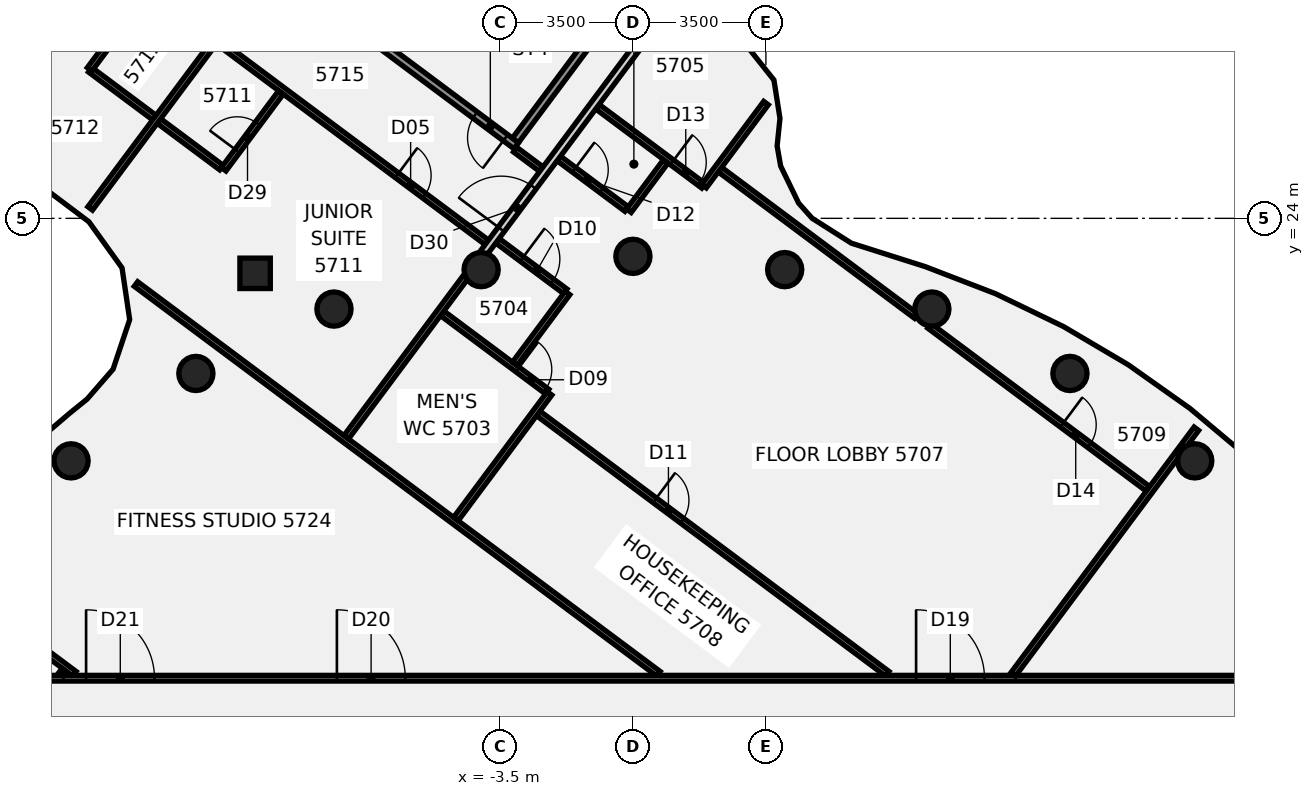
"""IFC4 building model, lengths in metres.
Left out: names, types, materials, properties, quantities, classifications, styles, units other than length and angle.
Written with IfcOpenShell. Run it as: python <this file> out.ifc"""

import sys

from ifc_helpers import new_model, si_unit, direction, frame, frame_2d, origin, origin_2d, place, context, subcontext, project, spatial, rectangle, circle, extrude, element, fill, save


model = new_model("IFC4")
c1 = context("Model", 3, precision=1e-05, world=origin(), true_north=direction((0.0, 1.0)))
c2 = subcontext(c1, "Body", "Model", "MODEL_VIEW")
j1 = project(units=[si_unit("LENGTHUNIT", "METRE"), si_unit("PLANEANGLEUNIT", "RADIAN")], contexts=[c1])
p1 = place(None, origin())
s1 = spatial("IfcSite", under=j1, at=p1, CompositionType="ELEMENT")
p2 = place(p1, origin())
s2 = spatial("IfcBuilding", under=s1, at=p2, CompositionType="ELEMENT")
p3 = place(p2, frame((0.0, 0.0, 227.1)))
s3 = spatial("IfcBuildingStorey", under=s2, at=p3, CompositionType="ELEMENT", Elevation=227.1)
for number, where, z_axis, x_axis in (
    (1, (14.784, 17.619, -0.14), (0.0, 0.0, 1.0), (1.0, 0.0, 0.0)),
    (2, (11.5, 19.919, -0.14), (0.0, 0.0, 1.0), (1.0, 0.0, 0.0)),
    (3, (7.866, 21.613, -0.14), (0.0, 0.0, 1.0), (1.0, 0.0, 0.0)),
    (4, (3.994, 22.651, -0.14), (0.0, 0.0, 1.0), (1.0, 0.0, 0.0)),
    (5, (0.0, 23.0, -0.14), (0.0, 0.0, 1.0), (1.0, 0.0, 0.0)),
    (6, (-3.994, 22.651, -0.14), (0.0, 0.0, 1.0), (1.0, 0.0, 0.0)),
    (7, (-7.866, 21.613, -0.14), (0.0, 0.0, 1.0), (1.0, 0.0, 0.0)),
    (8, (-11.5, 19.919, -0.14), (0.0, 0.0, 1.0), (1.0, 0.0, 0.0)),
    (9, (-14.784, 17.619, -0.14), (0.0, 0.0, 1.0), (1.0, 0.0, 0.0)),
):
    element("IfcColumn", number, at=place(p3, frame(where, z_axis=z_axis, x_axis=x_axis)), inside=s3, PredefinedType="COLUMN", context=c2, shape_type="SweptSolid", body=[
        extrude(circle(Radius=0.45, at=origin_2d()), origin(), (0.0, 0.0, 1.0), 3.6),
    ])
p4 = place(p3, frame((-9.942, 22.553, -0.139), z_axis=(-0.002304349187, -0.050289032263, 0.998732047753), x_axis=(0.597247430318, 0.800971813174, 0.041709249322)))
e10 = element("IfcColumn", 10, at=p4, inside=s3, PredefinedType="COLUMN", context=c2, shape_type="SweptSolid", body=[
    extrude(rectangle(XDim=0.8, YDim=0.8, at=origin_2d()), origin(), (0.0, 0.0, 1.0), 3.602),
])
p5 = place(p3, frame((-18.463, 14.827, 0.0), z_axis=(0.0, 0.0, 1.0), x_axis=(0.801555334436, -0.597920601617, 0.0)))
e11 = element("IfcWall", 11, at=p5, inside=s3, PredefinedType="PARTITIONING", context=c2, shape_type="SweptSolid", body=[
    extrude(rectangle(XDim=4.701, YDim=0.15, at=frame_2d((2.351, 0.0))), origin(), (0.0, 0.0, 1.0), 2.864),
])
p6 = place(p3, frame((-14.521, 31.333, 0.0), z_axis=(0.0, 0.0, 1.0), x_axis=(0.801510735955, -0.597980384418, 0.0)))
e12 = element("IfcWall", 12, at=p6, inside=s3, PredefinedType="PARTITIONING", context=c2, shape_type="SweptSolid", body=[
    extrude(rectangle(XDim=13.32, YDim=0.15, at=frame_2d((6.66, 0.0))), origin(), (0.0, 0.0, 1.0), 2.864),
])
p7 = place(p6, frame((10.37, 0.0, 0.0)))
e13 = element("IfcOpeningElement", 13, at=p7, cuts=e12, PredefinedType="OPENING", context=c2, shape_type="SweptSolid", body=[
    extrude(rectangle(XDim=0.9, YDim=2.1, at=frame_2d((0.45, 1.05))), frame((0.0, 0.085, 0.0), z_axis=(0.0, -1.0, 0.0), x_axis=(1.0, 0.0, 0.0)), (0.0, 0.0, 1.0), 0.17),
])
p8 = place(p6, frame((0.82, 0.0, 0.0)))
e14 = element("IfcOpeningElement", 14, at=p8, cuts=e12, PredefinedType="OPENING", context=c2, shape_type="SweptSolid", body=[
    extrude(rectangle(XDim=0.9, YDim=2.1, at=frame_2d((0.45, 1.05))), frame((0.0, 0.085, 0.0), z_axis=(0.0, -1.0, 0.0), x_axis=(1.0, 0.0, 0.0)), (0.0, 0.0, 1.0), 0.17),
])
p9 = place(p3, frame((-14.28, 27.909, 0.0), z_axis=(0.0, 0.0, 1.0), x_axis=(0.801738945952, -0.597674378356, 0.0)))
e15 = element("IfcWall", 15, at=p9, inside=s3, PredefinedType="PARTITIONING", context=c2, shape_type="SweptSolid", body=[
    extrude(rectangle(XDim=4.305, YDim=0.15, at=frame_2d((2.152, 0.0))), origin(), (0.0, 0.0, 1.0), 2.864),
])
p10 = place(p3, frame((-3.098, 25.807, 0.0), z_axis=(0.0, 0.0, 1.0), x_axis=(0.801599777433, -0.597861017979, 0.0)))
e16 = element("IfcWall", 16, at=p10, inside=s3, PredefinedType="PARTITIONING", context=c2, shape_type="SweptSolid", body=[
    extrude(rectangle(XDim=0.859, YDim=0.15, at=frame_2d((0.43, 0.0))), origin(), (0.0, 0.0, 1.0), 2.864),
])
p11 = place(p3, frame((-13.076, 22.271, 0.0), z_axis=(0.0, 0.0, 1.0), x_axis=(0.801609439626, -0.597848062891, 0.0)))
e17 = element("IfcWall", 17, at=p11, inside=s3, PredefinedType="PARTITIONING", context=c2, shape_type="SweptSolid", body=[
    extrude(rectangle(XDim=17.153, YDim=0.15, at=frame_2d((8.577, 0.0))), origin(), (0.0, 0.0, 1.0), 2.864),
])
p12 = place(p3, frame((-5.015, 21.498, 0.0), z_axis=(0.0, 0.0, 1.0), x_axis=(0.801666095662, -0.597772089568, 0.0)))
e18 = element("IfcWall", 18, at=p12, inside=s3, PredefinedType="PARTITIONING", context=c2, shape_type="SweptSolid", body=[
    extrude(rectangle(XDim=3.44, YDim=0.15, at=frame_2d((1.72, 0.0))), origin(), (0.0, 0.0, 1.0), 2.864),
])
p13 = place(p12, frame((2.47, 0.0, 0.0)))
e19 = element("IfcOpeningElement", 19, at=p13, cuts=e18, PredefinedType="OPENING", context=c2, shape_type="SweptSolid", body=[
    extrude(rectangle(XDim=0.9, YDim=2.1, at=frame_2d((0.45, 1.05))), frame((0.0, 0.085, 0.0), z_axis=(0.0, -1.0, 0.0), x_axis=(1.0, 0.0, 0.0)), (0.0, 0.0, 1.0), 0.17),
])
p14 = place(p3, frame((-3.564, 23.41, 0.0), z_axis=(0.0, 0.0, 1.0), x_axis=(0.801603412124, -0.59785614463, 0.0)))
e20 = element("IfcWall", 20, at=p14, inside=s3, PredefinedType="PARTITIONING", context=c2, shape_type="SweptSolid", body=[
    extrude(rectangle(XDim=2.225, YDim=0.15, at=frame_2d((1.113, 0.0))), origin(), (0.0, 0.0, 1.0), 2.864),
])
p15 = place(p14, frame((0.8, 0.0, 0.0)))
e21 = element("IfcOpeningElement", 21, at=p15, cuts=e20, PredefinedType="OPENING", context=c2, shape_type="SweptSolid", body=[
    extrude(rectangle(XDim=1.0, YDim=2.1, at=frame_2d((0.5, 1.05))), frame((0.0, 0.085, 0.0), z_axis=(0.0, -1.0, 0.0), x_axis=(1.0, 0.0, 0.0)), (0.0, 0.0, 1.0), 0.17),
])
p16 = place(p3, frame((-2.488, 18.865, 0.0), z_axis=(0.0, 0.0, 1.0), x_axis=(0.801633706651, -0.597815523686, 0.0)))
e22 = element("IfcWall", 22, at=p16, inside=s3, PredefinedType="PARTITIONING", context=c2, shape_type="SweptSolid", body=[
    extrude(rectangle(XDim=11.456, YDim=0.15, at=frame_2d((5.728, 0.0))), origin(), (0.0, 0.0, 1.0), 2.864),
])
p17 = place(p16, frame((3.82, 0.0, 0.0)))
e23 = element("IfcOpeningElement", 23, at=p17, cuts=e22, PredefinedType="OPENING", context=c2, shape_type="SweptSolid", body=[
    extrude(rectangle(XDim=0.9, YDim=2.1, at=frame_2d((0.45, 1.05))), frame((0.0, 0.085, 0.0), z_axis=(0.0, -1.0, 0.0), x_axis=(1.0, 0.0, 0.0)), (0.0, 0.0, 1.0), 0.17),
])
p18 = place(p3, frame((-1.95, 25.575, 0.0), z_axis=(0.0, 0.0, 1.0), x_axis=(0.801603412124, -0.59785614463, 0.0)))
e24 = element("IfcWall", 24, at=p18, inside=s3, PredefinedType="PARTITIONING", context=c2, shape_type="SweptSolid", body=[
    extrude(rectangle(XDim=2.225, YDim=0.15, at=frame_2d((1.113, 0.0))), origin(), (0.0, 0.0, 1.0), 2.864),
])
p19 = place(p18, frame((0.5, 0.0, 0.0)))
e25 = element("IfcOpeningElement", 25, at=p19, cuts=e24, PredefinedType="OPENING", context=c2, shape_type="SweptSolid", body=[
    extrude(rectangle(XDim=0.9, YDim=2.1, at=frame_2d((0.45, 1.05))), frame((0.0, 0.085, 0.0), z_axis=(0.0, -1.0, 0.0), x_axis=(1.0, 0.0, 0.0)), (0.0, 0.0, 1.0), 0.17),
])
p20 = place(p3, frame((-0.933, 26.937, 0.0), z_axis=(0.0, 0.0, 1.0), x_axis=(0.801462729776, -0.598044724732, 0.0)))
e26 = element("IfcWall", 26, at=p20, inside=s3, PredefinedType="PARTITIONING", context=c2, shape_type="SweptSolid", body=[
    extrude(rectangle(XDim=3.479, YDim=0.15, at=frame_2d((1.74, 0.0))), origin(), (0.0, 0.0, 1.0), 2.864),
])
p21 = place(p20, frame((2.449, 0.0, 0.0)))
e27 = element("IfcOpeningElement", 27, at=p21, cuts=e26, PredefinedType="OPENING", context=c2, shape_type="SweptSolid", body=[
    extrude(rectangle(XDim=0.9, YDim=2.1, at=frame_2d((0.45, 1.05))), frame((0.0, 0.085, 0.0), z_axis=(0.0, -1.0, 0.0), x_axis=(1.0, 0.0, 0.0)), (0.0, 0.0, 1.0), 0.17),
])
p22 = place(p3, frame((2.295, 25.278, 0.0), z_axis=(0.0, 0.0, 1.0), x_axis=(0.801612688657, -0.597843706486, 0.0)))
e28 = element("IfcWall", 28, at=p22, inside=s3, PredefinedType="PARTITIONING", context=c2, shape_type="SweptSolid", body=[
    extrude(rectangle(XDim=6.438, YDim=0.15, at=frame_2d((3.219, 0.0))), origin(), (0.0, 0.0, 1.0), 2.864),
])
p23 = place(p3, frame((7.804, 21.17, 0.0), z_axis=(0.0, 0.0, 1.0), x_axis=(0.801611703951, -0.597845026816, 0.0)))
e29 = element("IfcWall", 29, at=p23, inside=s3, PredefinedType="PARTITIONING", context=c2, shape_type="SweptSolid", body=[
    extrude(rectangle(XDim=7.167, YDim=0.15, at=frame_2d((3.583, 0.0))), origin(), (0.0, 0.0, 1.0), 2.864),
])
p24 = place(p23, frame((4.35, 0.0, 0.0)))
e30 = element("IfcOpeningElement", 30, at=p24, cuts=e29, PredefinedType="OPENING", context=c2, shape_type="SweptSolid", body=[
    extrude(rectangle(XDim=0.9, YDim=2.1, at=frame_2d((0.45, 1.05))), frame((0.0, 0.085, 0.0), z_axis=(0.0, -1.0, 0.0), x_axis=(1.0, 0.0, 0.0)), (0.0, 0.0, 1.0), 0.17),
])
p25 = place(p3, frame((-17.065, 11.9, 0.0), z_axis=(0.0, 0.0, 1.0), x_axis=(1.0, 0.0, 0.0)))
e31 = element("IfcWall", 31, at=p25, inside=s3, PredefinedType="PARTITIONING", context=c2, shape_type="SweptSolid", body=[
    extrude(rectangle(XDim=34.165, YDim=0.15, at=frame_2d((17.083, 0.0))), origin(), (0.0, 0.0, 1.0), 2.864),
])
p26 = place(p25, frame((24.517, 0.0, 0.0)))
e32 = element("IfcOpeningElement", 32, at=p26, cuts=e31, PredefinedType="OPENING", context=c2, shape_type="SweptSolid", body=[
    extrude(rectangle(XDim=1.8, YDim=2.1, at=frame_2d((0.9, 1.05))), frame((0.0, 0.085, 0.0), z_axis=(0.0, -1.0, 0.0), x_axis=(1.0, 0.0, 0.0)), (0.0, 0.0, 1.0), 0.17),
])
p27 = place(p25, frame((9.276, 0.0, 0.0)))
e33 = element("IfcOpeningElement", 33, at=p27, cuts=e31, PredefinedType="OPENING", context=c2, shape_type="SweptSolid", body=[
    extrude(rectangle(XDim=1.8, YDim=2.1, at=frame_2d((0.9, 1.05))), frame((0.0, 0.085, 0.0), z_axis=(0.0, -1.0, 0.0), x_axis=(1.0, 0.0, 0.0)), (0.0, 0.0, 1.0), 0.17),
])
p28 = place(p25, frame((2.676, 0.0, 0.0)))
e34 = element("IfcOpeningElement", 34, at=p28, cuts=e31, PredefinedType="OPENING", context=c2, shape_type="SweptSolid", body=[
    extrude(rectangle(XDim=1.8, YDim=2.1, at=frame_2d((0.9, 1.05))), frame((0.0, 0.085, 0.0), z_axis=(0.0, -1.0, 0.0), x_axis=(1.0, 0.0, 0.0)), (0.0, 0.0, 1.0), 0.17),
])
p29 = place(p3, frame((-15.047, 12.0, 0.0), z_axis=(0.0, 0.0, 1.0), x_axis=(0.598084412892, 0.801433113276, 0.0)))
e35 = element("IfcWall", 35, at=p29, inside=s3, PredefinedType="PARTITIONING", context=c2, shape_type="SweptSolid", body=[
    extrude(rectangle(XDim=0.143, YDim=0.15, at=frame_2d((0.071, 0.0))), origin(), (0.0, 0.0, 1.0), 2.864),
])
p30 = place(p3, frame((-17.877, 26.967, 0.0), z_axis=(0.0, 0.0, 1.0), x_axis=(0.597867717707, 0.801594780499, 0.0)))
e36 = element("IfcWall", 36, at=p30, inside=s3, PredefinedType="PARTITIONING", context=c2, shape_type="SweptSolid", body=[
    extrude(rectangle(XDim=13.405, YDim=0.15, at=frame_2d((6.703, 0.0))), origin(), (0.0, 0.0, 1.0), 2.864),
])
p31 = place(p30, frame((6.857, 0.0, 0.0)))
e37 = element("IfcOpeningElement", 37, at=p31, cuts=e36, PredefinedType="OPENING", context=c2, shape_type="SweptSolid", body=[
    extrude(rectangle(XDim=0.9, YDim=2.1, at=frame_2d((0.45, 1.05))), frame((0.0, 0.085, 0.0), z_axis=(0.0, -1.0, 0.0), x_axis=(1.0, 0.0, 0.0)), (0.0, 0.0, 1.0), 0.17),
])
p32 = place(p3, frame((-14.296, 27.921, 0.0), z_axis=(0.0, 0.0, 1.0), x_axis=(0.597548490033, 0.801832776867, 0.0)))
e38 = element("IfcWall", 38, at=p32, inside=s3, PredefinedType="PARTITIONING", context=c2, shape_type="SweptSolid", body=[
    extrude(rectangle(XDim=2.521, YDim=0.15, at=frame_2d((1.26, 0.0))), origin(), (0.0, 0.0, 1.0), 2.864),
])
p33 = place(p32, frame((0.6, 0.0, 0.0)))
e39 = element("IfcOpeningElement", 39, at=p33, cuts=e38, PredefinedType="OPENING", context=c2, shape_type="SweptSolid", body=[
    extrude(rectangle(XDim=0.9, YDim=2.1, at=frame_2d((0.45, 1.05))), frame((0.0, 0.085, 0.0), z_axis=(0.0, -1.0, 0.0), x_axis=(1.0, 0.0, 0.0)), (0.0, 0.0, 1.0), 0.17),
])
p34 = place(p3, frame((-14.281, 24.261, 0.0), z_axis=(0.0, 0.0, 1.0), x_axis=(0.59794643903, 0.801536060356, 0.0)))
e40 = element("IfcWall", 40, at=p34, inside=s3, PredefinedType="PARTITIONING", context=c2, shape_type="SweptSolid", body=[
    extrude(rectangle(XDim=5.446, YDim=0.15, at=frame_2d((2.723, 0.0))), origin(), (0.0, 0.0, 1.0), 2.864),
])
p35 = place(p3, frame((-10.769, 25.291, 0.0), z_axis=(0.0, 0.0, 1.0), x_axis=(0.597842875799, 0.801613308183, 0.0)))
e41 = element("IfcWall", 41, at=p35, inside=s3, PredefinedType="PARTITIONING", context=c2, shape_type="SweptSolid", body=[
    extrude(rectangle(XDim=2.52, YDim=0.15, at=frame_2d((1.26, 0.0))), origin(), (0.0, 0.0, 1.0), 2.864),
])
p36 = place(p35, frame((0.6, 0.0, 0.0)))
e42 = element("IfcOpeningElement", 42, at=p36, cuts=e41, PredefinedType="OPENING", context=c2, shape_type="SweptSolid", body=[
    extrude(rectangle(XDim=0.9, YDim=2.1, at=frame_2d((0.45, 1.05))), frame((0.0, 0.085, 0.0), z_axis=(0.0, -1.0, 0.0), x_axis=(1.0, 0.0, 0.0)), (0.0, 0.0, 1.0), 0.17),
])
p37 = place(p3, frame((-7.542, 18.243, 0.0), z_axis=(0.0, 0.0, 1.0), x_axis=(0.597845440825, 0.801611395182, 0.0)))
e43 = element("IfcWall", 43, at=p37, inside=s3, PredefinedType="PARTITIONING", context=c2, shape_type="SweptSolid", body=[
    extrude(rectangle(XDim=5.426, YDim=0.15, at=frame_2d((2.713, 0.0))), origin(), (0.0, 0.0, 1.0), 2.864),
])
p38 = place(p3, frame((-4.029, 22.954, 0.0), z_axis=(0.0, 0.0, 1.0), x_axis=(0.597834716072, 0.80161939364, 0.0)))
e44 = element("IfcWall", 44, at=p38, inside=s3, PredefinedType="PARTITIONING", context=c2, shape_type="SweptSolid", body=[
    extrude(rectangle(XDim=8.343, YDim=0.2, at=frame_2d((4.171, 0.0))), origin(), (0.0, 0.0, 1.0), 2.864),
])
p39 = place(p38, frame((0.944, 0.0, 0.0)))
e45 = element("IfcOpeningElement", 45, at=p39, cuts=e44, PredefinedType="OPENING", context=c2, shape_type="SweptSolid", body=[
    extrude(rectangle(XDim=1.4, YDim=2.1, at=frame_2d((0.7, 1.05))), frame((0.0, 0.11, 0.0), z_axis=(0.0, -1.0, 0.0), x_axis=(1.0, 0.0, 0.0)), (0.0, 0.0, 1.0), 0.22),
])
p40 = place(p3, frame((-4.656, 16.091, 0.0), z_axis=(0.0, 0.0, 1.0), x_axis=(0.597779350617, 0.801660681321, 0.0)))
e46 = element("IfcWall", 46, at=p40, inside=s3, PredefinedType="PARTITIONING", context=c2, shape_type="SweptSolid", body=[
    extrude(rectangle(XDim=4.12, YDim=0.15, at=frame_2d((2.06, 0.0))), origin(), (0.0, 0.0, 1.0), 2.864),
])
p41 = place(p3, frame((1.872, 24.845, 0.0), z_axis=(0.0, 0.0, 1.0), x_axis=(0.597735174372, 0.801693620605, 0.0)))
e47 = element("IfcWall", 47, at=p41, inside=s3, PredefinedType="PARTITIONING", context=c2, shape_type="SweptSolid", body=[
    extrude(rectangle(XDim=2.728, YDim=0.15, at=frame_2d((1.364, 0.0))), origin(), (0.0, 0.0, 1.0), 2.864),
])
p42 = place(p3, frame((-3.107, 20.175, 0.0), z_axis=(0.0, 0.0, 1.0), x_axis=(0.59787659673, 0.801588158023, 0.0)))
e48 = element("IfcWall", 48, at=p42, inside=s3, PredefinedType="PARTITIONING", context=c2, shape_type="SweptSolid", body=[
    extrude(rectangle(XDim=2.32, YDim=0.15, at=frame_2d((1.16, 0.0))), origin(), (0.0, 0.0, 1.0), 2.864),
])
p43 = place(p3, frame((-0.105, 24.2, 0.0), z_axis=(0.0, 0.0, 1.0), x_axis=(0.597874790731, 0.801589505051, 0.0)))
e49 = element("IfcWall", 49, at=p43, inside=s3, PredefinedType="PARTITIONING", context=c2, shape_type="SweptSolid", body=[
    extrude(rectangle(XDim=1.619, YDim=0.15, at=frame_2d((0.81, 0.0))), origin(), (0.0, 0.0, 1.0), 2.864),
])
p44 = place(p3, frame((10.007, 12.0, 0.0), z_axis=(0.0, 0.0, 1.0), x_axis=(0.597856528109, 0.801603126115, 0.0)))
e50 = element("IfcWall", 50, at=p44, inside=s3, PredefinedType="PARTITIONING", context=c2, shape_type="SweptSolid", body=[
    extrude(rectangle(XDim=8.063, YDim=0.15, at=frame_2d((4.031, 0.0))), origin(), (0.0, 0.0, 1.0), 2.864),
])
p45 = place(p3, frame((-3.071, 25.912, -0.14), z_axis=(0.0, 0.0, 1.0), x_axis=(-0.801610604225, 0.597846501365, 0.0)))
e51 = element("IfcWall", 51, at=p45, inside=s3, PredefinedType="SHEAR", context=c2, shape_type="SweptSolid", body=[
    extrude(rectangle(XDim=6.7, YDim=0.2, at=frame_2d((3.35, 0.0))), origin(), (0.0, 0.0, 1.0), 3.004),
])
p46 = place(p45, frame((0.35, 0.0, 0.0)))
e52 = element("IfcOpeningElement", 52, at=p46, cuts=e51, PredefinedType="OPENING", context=c2, shape_type="SweptSolid", body=[
    extrude(rectangle(XDim=1.0, YDim=2.1, at=frame_2d((0.5, 1.05))), frame((0.0, 0.11, 0.0), z_axis=(0.0, -1.0, 0.0), x_axis=(1.0, 0.0, 0.0)), (0.0, 0.0, 1.0), 0.22),
])
p47 = place(p3, frame((-1.178, 28.617, -0.14), z_axis=(0.0, 0.0, 1.0), x_axis=(-0.597873739401, -0.801590289197, 0.0)))
e53 = element("IfcWall", 53, at=p47, inside=s3, PredefinedType="SHEAR", context=c2, shape_type="SweptSolid", body=[
    extrude(rectangle(XDim=3.2, YDim=0.2, at=frame_2d((1.6, 0.0))), origin(), (0.0, 0.0, 1.0), 3.6),
])
p48 = place(p7, frame((0.9, 0.0, 0.0), z_axis=(0.0, 0.0, 1.0), x_axis=(-1.0, 0.0, 0.0)))
e54 = element("IfcDoor", 54, at=p48, inside=s3, OperationType="SINGLE_SWING_RIGHT", PredefinedType="DOOR", context=c2, shape_type="SweptSolid", body=[
    extrude(rectangle(XDim=0.9, YDim=2.1, at=frame_2d((0.45, 1.05))), frame((0.0, 0.025, 0.0), z_axis=(0.0, -1.0, 0.0), x_axis=(1.0, 0.0, 0.0)), (0.0, 0.0, 1.0), 0.05),
])
fill(e13, e54)
p49 = place(p13, frame((0.9, 0.0, 0.0), z_axis=(0.0, 0.0, 1.0), x_axis=(-1.0, 0.0, 0.0)))
e55 = element("IfcDoor", 55, at=p49, inside=s3, OperationType="SINGLE_SWING_RIGHT", PredefinedType="DOOR", context=c2, shape_type="SweptSolid", body=[
    extrude(rectangle(XDim=0.9, YDim=2.1, at=frame_2d((0.45, 1.05))), frame((0.0, 0.025, 0.0), z_axis=(0.0, -1.0, 0.0), x_axis=(1.0, 0.0, 0.0)), (0.0, 0.0, 1.0), 0.05),
])
fill(e19, e55)
p50 = place(p15, frame((1.0, 0.0, 0.0), z_axis=(0.0, 0.0, 1.0), x_axis=(-1.0, 0.0, 0.0)))
e56 = element("IfcDoor", 56, at=p50, inside=s3, OperationType="SINGLE_SWING_RIGHT", PredefinedType="DOOR", context=c2, shape_type="SweptSolid", body=[
    extrude(rectangle(XDim=1.0, YDim=2.1, at=frame_2d((0.5, 1.05))), frame((0.0, 0.025, 0.0), z_axis=(0.0, -1.0, 0.0), x_axis=(1.0, 0.0, 0.0)), (0.0, 0.0, 1.0), 0.05),
])
fill(e21, e56)
p51 = place(p17, frame((0.9, 0.0, 0.0), z_axis=(0.0, 0.0, 1.0), x_axis=(-1.0, 0.0, 0.0)))
e57 = element("IfcDoor", 57, at=p51, inside=s3, OperationType="SINGLE_SWING_LEFT", PredefinedType="DOOR", context=c2, shape_type="SweptSolid", body=[
    extrude(rectangle(XDim=0.9, YDim=2.1, at=frame_2d((0.45, 1.05))), frame((0.0, 0.025, 0.0), z_axis=(0.0, -1.0, 0.0), x_axis=(1.0, 0.0, 0.0)), (0.0, 0.0, 1.0), 0.05),
])
fill(e23, e57)
p52 = place(p19, origin())
e58 = element("IfcDoor", 58, at=p52, inside=s3, OperationType="SINGLE_SWING_RIGHT", PredefinedType="DOOR", context=c2, shape_type="SweptSolid", body=[
    extrude(rectangle(XDim=0.9, YDim=2.1, at=frame_2d((0.45, 1.05))), frame((0.0, 0.025, 0.0), z_axis=(0.0, -1.0, 0.0), x_axis=(1.0, 0.0, 0.0)), (0.0, 0.0, 1.0), 0.05),
])
fill(e25, e58)
p53 = place(p21, origin())
e59 = element("IfcDoor", 59, at=p53, inside=s3, OperationType="SINGLE_SWING_LEFT", PredefinedType="DOOR", context=c2, shape_type="SweptSolid", body=[
    extrude(rectangle(XDim=0.9, YDim=2.1, at=frame_2d((0.45, 1.05))), frame((0.0, 0.025, 0.0), z_axis=(0.0, -1.0, 0.0), x_axis=(1.0, 0.0, 0.0)), (0.0, 0.0, 1.0), 0.05),
])
fill(e27, e59)
p54 = place(p24, origin())
e60 = element("IfcDoor", 60, at=p54, inside=s3, OperationType="SINGLE_SWING_LEFT", PredefinedType="DOOR", context=c2, shape_type="SweptSolid", body=[
    extrude(rectangle(XDim=0.9, YDim=2.1, at=frame_2d((0.45, 1.05))), frame((0.0, 0.025, 0.0), z_axis=(0.0, -1.0, 0.0), x_axis=(1.0, 0.0, 0.0)), (0.0, 0.0, 1.0), 0.05),
])
fill(e30, e60)
p55 = place(p26, frame((1.8, 0.0, 0.0), z_axis=(0.0, 0.0, 1.0), x_axis=(-1.0, 0.0, 0.0)))
e61 = element("IfcDoor", 61, at=p55, inside=s3, OperationType="DOUBLE_DOOR_SINGLE_SWING", PredefinedType="DOOR", context=c2, shape_type="SweptSolid", body=[
    extrude(rectangle(XDim=1.8, YDim=2.1, at=frame_2d((0.9, 1.05))), frame((0.0, 0.025, 0.0), z_axis=(0.0, -1.0, 0.0), x_axis=(1.0, 0.0, 0.0)), (0.0, 0.0, 1.0), 0.05),
])
fill(e32, e61)
p56 = place(p27, origin())
e62 = element("IfcDoor", 62, at=p56, inside=s3, OperationType="DOUBLE_DOOR_SINGLE_SWING", PredefinedType="DOOR", context=c2, shape_type="SweptSolid", body=[
    extrude(rectangle(XDim=1.8, YDim=2.1, at=frame_2d((0.9, 1.05))), frame((0.0, 0.025, 0.0), z_axis=(0.0, -1.0, 0.0), x_axis=(1.0, 0.0, 0.0)), (0.0, 0.0, 1.0), 0.05),
])
fill(e33, e62)
p57 = place(p28, origin())
e63 = element("IfcDoor", 63, at=p57, inside=s3, OperationType="DOUBLE_DOOR_SINGLE_SWING", PredefinedType="DOOR", context=c2, shape_type="SweptSolid", body=[
    extrude(rectangle(XDim=1.8, YDim=2.1, at=frame_2d((0.9, 1.05))), frame((0.0, 0.025, 0.0), z_axis=(0.0, -1.0, 0.0), x_axis=(1.0, 0.0, 0.0)), (0.0, 0.0, 1.0), 0.05),
])
fill(e34, e63)
p58 = place(p36, origin())
e64 = element("IfcDoor", 64, at=p58, inside=s3, OperationType="SINGLE_SWING_RIGHT", PredefinedType="DOOR", context=c2, shape_type="SweptSolid", body=[
    extrude(rectangle(XDim=0.9, YDim=2.1, at=frame_2d((0.45, 1.05))), frame((0.0, 0.025, 0.0), z_axis=(0.0, -1.0, 0.0), x_axis=(1.0, 0.0, 0.0)), (0.0, 0.0, 1.0), 0.05),
])
fill(e42, e64)
p59 = place(p39, frame((1.4, 0.0, 0.0), z_axis=(0.0, 0.0, 1.0), x_axis=(-1.0, 0.0, 0.0)))
e65 = element("IfcDoor", 65, at=p59, inside=s3, OperationType="DOUBLE_DOOR_SINGLE_SWING", PredefinedType="DOOR", context=c2, shape_type="SweptSolid", body=[
    extrude(rectangle(XDim=1.4, YDim=2.1, at=frame_2d((0.7, 1.05))), frame((0.0, 0.025, 0.0), z_axis=(0.0, -1.0, 0.0), x_axis=(1.0, 0.0, 0.0)), (0.0, 0.0, 1.0), 0.05),
])
fill(e45, e65)
p60 = place(p46, origin())
e66 = element("IfcDoor", 66, at=p60, inside=s3, OperationType="SINGLE_SWING_LEFT", PredefinedType="DOOR", context=c2, shape_type="SweptSolid", body=[
    extrude(rectangle(XDim=1.0, YDim=2.1, at=frame_2d((0.5, 1.05))), frame((0.0, 0.025, 0.0), z_axis=(0.0, -1.0, 0.0), x_axis=(1.0, 0.0, 0.0)), (0.0, 0.0, 1.0), 0.05),
])
fill(e52, e66)
save(model, sys.argv[1])
